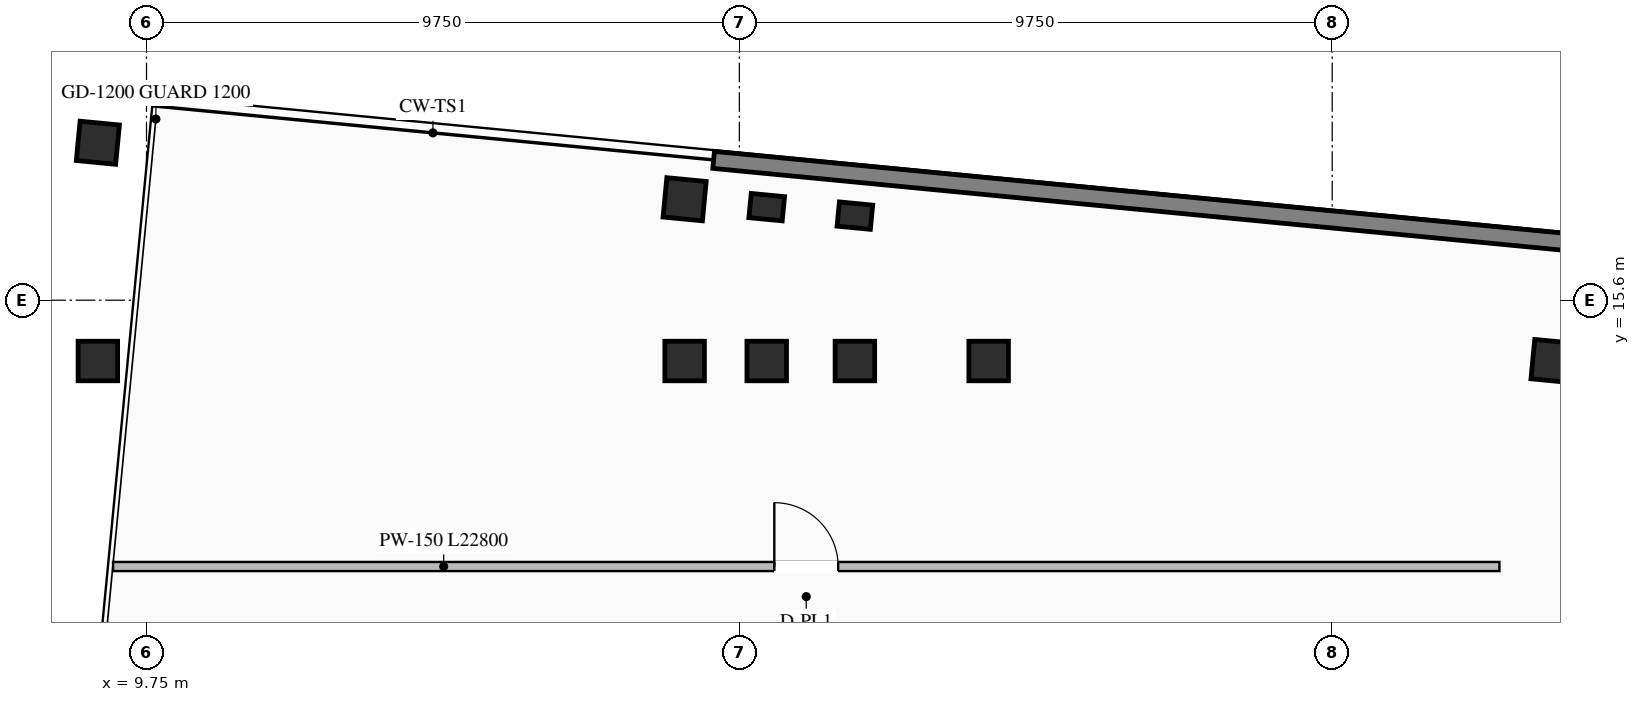
"""IFC4 building model, lengths in metres.
Left out: names, types, materials, properties, quantities, classifications, styles, units other than length and angle.
Written with IfcOpenShell. Run it as: python <this file> out.ifc"""

import sys

from ifc_helpers import new_model, si_unit, direction, frame, frame_2d, origin, origin_2d, place, context, subcontext, project, spatial, rectangle, i_section, extrude, element, fill, save


model = new_model("IFC4")
c1 = context("Model", 3, precision=1e-05, world=origin(), true_north=direction((0.0, 1.0)))
c2 = subcontext(c1, "Body", "Model", "MODEL_VIEW")
j1 = project(units=[si_unit("LENGTHUNIT", "METRE"), si_unit("PLANEANGLEUNIT", "RADIAN")], contexts=[c1])
p1 = place(None, origin())
s1 = spatial("IfcSite", under=j1, at=p1, CompositionType="ELEMENT")
p2 = place(p1, origin())
s2 = spatial("IfcBuilding", under=s1, at=p2, CompositionType="ELEMENT")
p3 = place(p2, frame((0.0, 0.0, 199.5)))
s3 = spatial("IfcBuildingStorey", under=s2, at=p3, CompositionType="ELEMENT", Elevation=199.5)
for number, where, z_axis, x_axis in (
    (1, (8.95, 14.6, 0.0), (0.0, 0.0, 1.0), (1.0, 0.0, 0.0)),
    (2, (18.6, 14.6, 0.0), (0.0, 0.0, 1.0), (1.0, 0.0, 0.0)),
    (3, (19.95, 14.6, 0.0), (0.0, 0.0, 1.0), (1.0, 0.0, 0.0)),
    (4, (21.4, 14.6, 0.0), (0.0, 0.0, 1.0), (1.0, 0.0, 0.0)),
    (5, (23.6, 14.6, 0.0), (0.0, 0.0, 1.0), (1.0, 0.0, 0.0)),
    (6, (8.95, 18.19, 0.0), (0.0, 0.0, 1.0), (0.995, -0.096, 0.0)),
    (7, (18.6, 17.26, 0.0), (0.0, 0.0, 1.0), (0.995, -0.096, 0.0)),
    (8, (32.874, 14.6, 0.0), (0.0, 0.0, 1.0), (0.995, -0.096, 0.0)),
):
    element("IfcColumn", number, at=place(p3, frame(where, z_axis=z_axis, x_axis=x_axis)), inside=s3, PredefinedType="COLUMN", context=c2, shape_type="SweptSolid", body=[
        extrude(i_section(OverallWidth=0.65, OverallDepth=0.65, WebThickness=0.028, FlangeThickness=0.04, at=origin_2d()), origin(), (0.0, 0.0, 1.0), 4.8),
    ])
for number, where, z_axis, x_axis in (
    (9, (19.95, 17.131, 0.0), (0.0, 0.0, 1.0), (0.995, -0.096, 0.0)),
    (10, (21.4, 16.991, 0.0), (0.0, 0.0, 1.0), (0.995, -0.096, 0.0)),
):
    element("IfcColumn", number, at=place(p3, frame(where, z_axis=z_axis, x_axis=x_axis)), inside=s3, PredefinedType="PILASTER", context=c2, shape_type="SweptSolid", body=[
        extrude(rectangle(XDim=0.55, YDim=0.4, at=origin_2d()), origin(), (0.0, 0.0, 1.0), 4.8),
    ])
p4 = place(p3, frame((19.077, 17.908, 0.0), z_axis=(0.0, 0.0, 1.0), x_axis=(0.995395606285, -0.095851901334, 0.0)))
e11 = element("IfcWall", 11, at=p4, inside=s3, PredefinedType="STANDARD", context=c2, shape_type="SweptSolid", body=[
    extrude(rectangle(XDim=14.34, YDim=0.28, at=frame_2d((7.17, 0.0))), origin(), (0.0, 0.0, 1.0), 4.5),
])
p5 = place(p3, frame((9.2, 11.22, 0.0), z_axis=(0.0, 0.0, 1.0), x_axis=(1.0, 0.0, 0.0)))
e12 = element("IfcWall", 12, at=p5, inside=s3, PredefinedType="STANDARD", context=c2, shape_type="SweptSolid", body=[
    extrude(rectangle(XDim=22.8, YDim=0.15, at=frame_2d((11.4, 0.0))), origin(), (0.0, 0.0, 1.0), 4.5),
])
p6 = place(p5, frame((10.875, 0.0, 0.0)))
e13 = element("IfcOpeningElement", 13, at=p6, cuts=e12, PredefinedType="OPENING", context=c2, shape_type="SweptSolid", body=[
    extrude(rectangle(XDim=1.05, YDim=2.08, at=frame_2d((0.525, 1.04))), frame((0.0, 0.085, 0.0), z_axis=(0.0, -1.0, 0.0), x_axis=(1.0, 0.0, 0.0)), (0.0, 0.0, 1.0), 0.17),
])
p7 = place(p6, origin())
e14 = element("IfcDoor", 14, at=p7, inside=s3, OperationType="SINGLE_SWING_LEFT", PredefinedType="DOOR", context=c2, shape_type="SweptSolid", body=[
    extrude(rectangle(XDim=1.05, YDim=2.08, at=frame_2d((0.525, 1.04))), frame((0.0, 0.025, 0.0), z_axis=(0.0, -1.0, 0.0), x_axis=(1.0, 0.0, 0.0)), (0.0, 0.0, 1.0), 0.05),
])
fill(e13, e14)
save(model, sys.argv[1])
